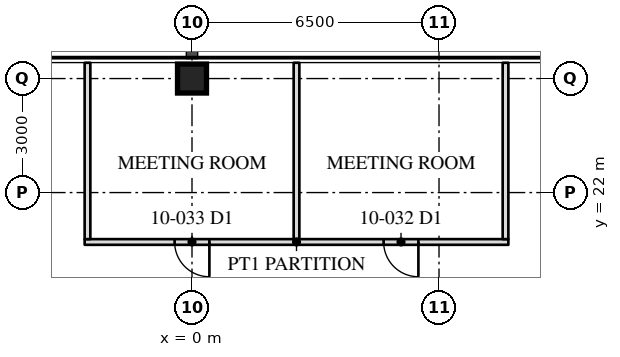
"""IFC4 building model, lengths in metres.
Left out: names, types, materials, properties, quantities, classifications, styles, units other than length and angle.
Written with IfcOpenShell. Run it as: python <this file> out.ifc"""

import sys

from ifc_helpers import new_model, si_unit, direction, frame, frame_2d, origin, origin_2d, place, context, subcontext, project, spatial, rectangle, hollow_rectangle, extrude, element, fill, save


model = new_model("IFC4")
c1 = context("Model", 3, precision=1e-05, world=origin(), true_north=direction((0.0, 1.0)))
c2 = subcontext(c1, "Body", "Model", "MODEL_VIEW")
j1 = project(units=[si_unit("LENGTHUNIT", "METRE"), si_unit("PLANEANGLEUNIT", "RADIAN")], contexts=[c1])
p1 = place(None, origin())
s1 = spatial("IfcSite", under=j1, at=p1, CompositionType="ELEMENT")
p2 = place(p1, origin())
s2 = spatial("IfcBuilding", under=s1, at=p2, CompositionType="ELEMENT")
p3 = place(p2, frame((0.0, 0.0, 44.7)))
s3 = spatial("IfcBuildingStorey", under=s2, at=p3, CompositionType="ELEMENT", Elevation=44.7)
p4 = place(p3, frame((0.0, 25.0, 0.0), z_axis=(0.0, 0.0, 1.0), x_axis=(1.0, 0.0, 0.0)))
e1 = element("IfcColumn", 1, at=p4, inside=s3, PredefinedType="COLUMN", context=c2, shape_type="SweptSolid", body=[
    extrude(hollow_rectangle(XDim=0.762, YDim=0.762, WallThickness=0.127, at=origin_2d()), origin(), (0.0, 0.0, 1.0), 4.1),
])
p5 = place(p3, frame((8.325, 20.7, 0.0), z_axis=(0.0, 0.0, 1.0), x_axis=(-1.0, 0.0, 0.0)))
e2 = element("IfcWall", 2, at=p5, inside=s3, PredefinedType="PARTITIONING", context=c2, shape_type="SweptSolid", body=[
    extrude(rectangle(XDim=11.15, YDim=0.15, at=frame_2d((5.575, 0.0))), origin(), (0.0, 0.0, 1.0), 3.91),
])
p6 = place(p5, frame((2.367, 0.0, 0.0)))
e3 = element("IfcOpeningElement", 3, at=p6, cuts=e2, PredefinedType="OPENING", context=c2, shape_type="SweptSolid", body=[
    extrude(rectangle(XDim=0.915, YDim=2.134, at=frame_2d((0.458, 1.067))), frame((0.0, 0.085, 0.0), z_axis=(0.0, -1.0, 0.0), x_axis=(1.0, 0.0, 0.0)), (0.0, 0.0, 1.0), 0.17),
])
p7 = place(p5, frame((7.867, 0.0, 0.0)))
e4 = element("IfcOpeningElement", 4, at=p7, cuts=e2, PredefinedType="OPENING", context=c2, shape_type="SweptSolid", body=[
    extrude(rectangle(XDim=0.915, YDim=2.134, at=frame_2d((0.458, 1.067))), frame((0.0, 0.085, 0.0), z_axis=(0.0, -1.0, 0.0), x_axis=(1.0, 0.0, 0.0)), (0.0, 0.0, 1.0), 0.17),
])
for number, where, z_axis, x_axis in (
    (5, (8.25, 20.775, 0.0), (0.0, 0.0, 1.0), (0.0, 1.0, 0.0)),
    (6, (2.75, 20.775, 0.0), (0.0, 0.0, 1.0), (0.0, 1.0, 0.0)),
    (7, (-2.75, 20.775, 0.0), (0.0, 0.0, 1.0), (0.0, 1.0, 0.0)),
):
    element("IfcWall", number, at=place(p3, frame(where, z_axis=z_axis, x_axis=x_axis)), inside=s3, PredefinedType="PARTITIONING", context=c2, shape_type="SweptSolid", body=[
        extrude(rectangle(XDim=4.64, YDim=0.15, at=frame_2d((2.32, 0.0))), origin(), (0.0, 0.0, 1.0), 3.91),
    ])
p8 = place(p6, origin())
e8 = element("IfcDoor", 8, at=p8, inside=s3, OperationType="SINGLE_SWING_LEFT", PredefinedType="DOOR", context=c2, shape_type="SweptSolid", body=[
    extrude(rectangle(XDim=0.915, YDim=2.134, at=frame_2d((0.458, 1.067))), frame((0.0, 0.025, 0.0), z_axis=(0.0, -1.0, 0.0), x_axis=(1.0, 0.0, 0.0)), (0.0, 0.0, 1.0), 0.05),
])
fill(e3, e8)
p9 = place(p7, origin())
e9 = element("IfcDoor", 9, at=p9, inside=s3, OperationType="SINGLE_SWING_LEFT", PredefinedType="DOOR", context=c2, shape_type="SweptSolid", body=[
    extrude(rectangle(XDim=0.915, YDim=2.134, at=frame_2d((0.458, 1.067))), frame((0.0, 0.025, 0.0), z_axis=(0.0, -1.0, 0.0), x_axis=(1.0, 0.0, 0.0)), (0.0, 0.0, 1.0), 0.05),
])
fill(e4, e9)
save(model, sys.argv[1])
